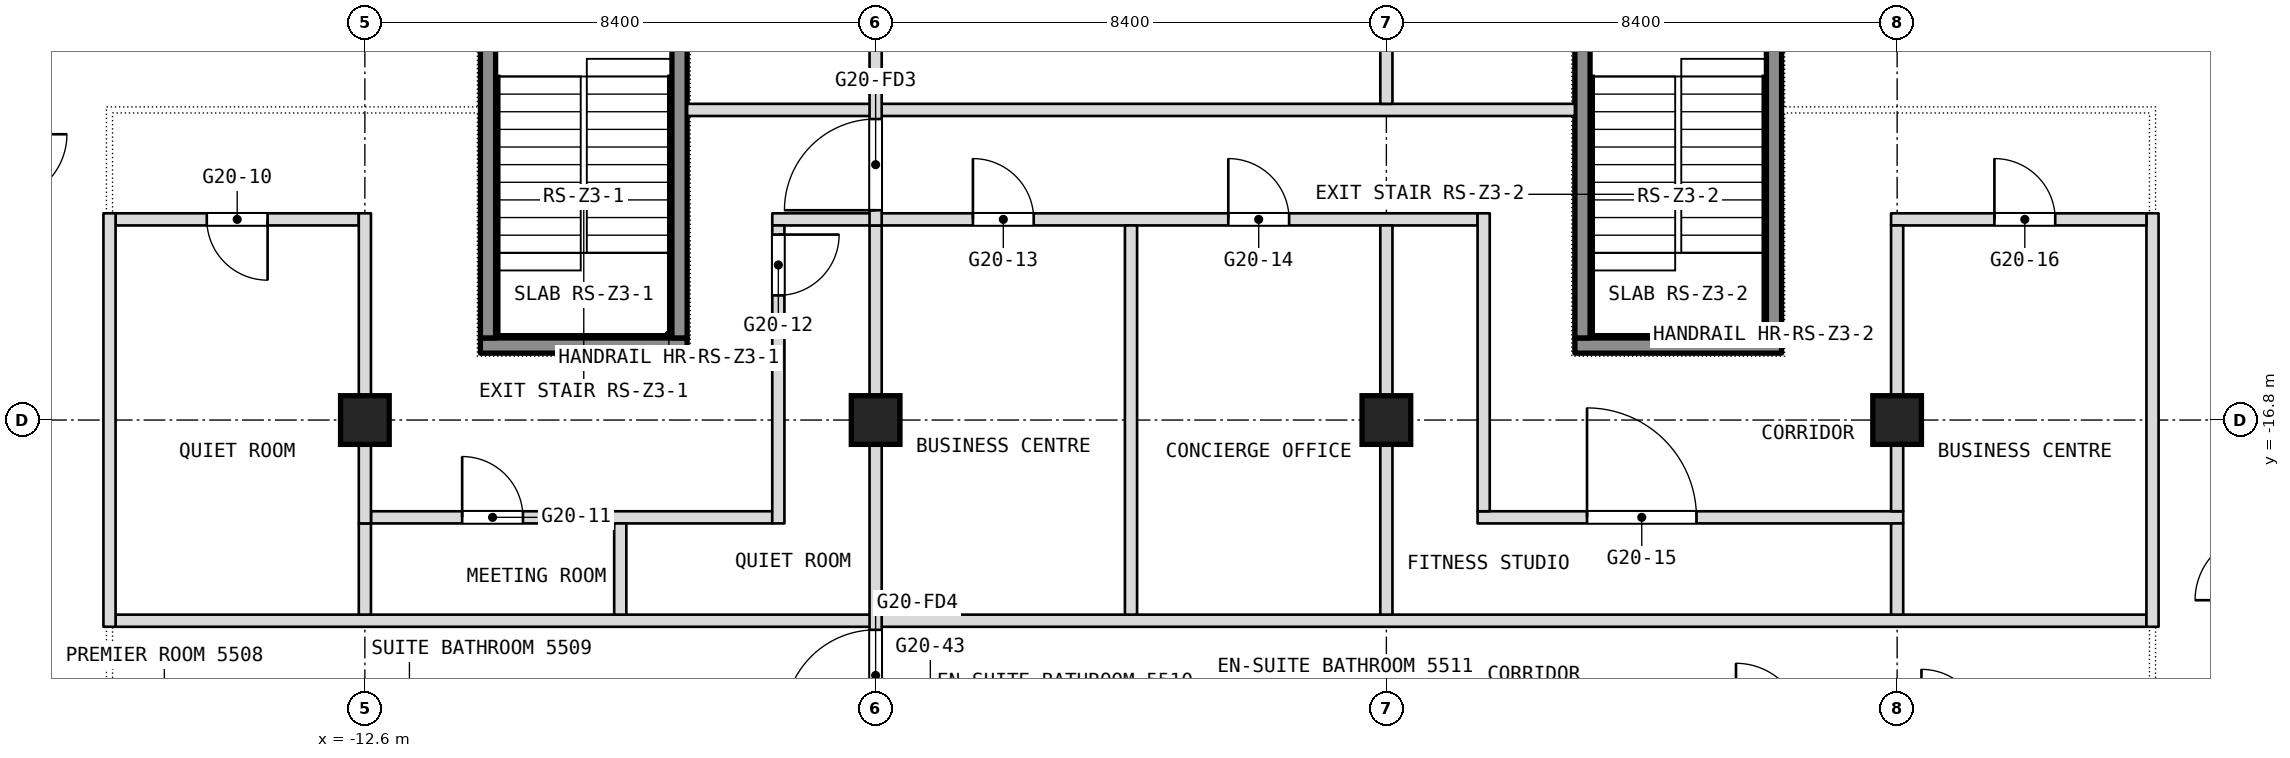
"""IFC4 building model, lengths in metres.
Left out: names, types, materials, properties, quantities, classifications, styles, units other than length and angle.
Written with IfcOpenShell. Run it as: python <this file> out.ifc"""

import sys

from ifc_helpers import new_model, si_unit, direction, frame, frame_2d, origin, origin_2d, place, context, subcontext, project, spatial, rectangle, extrude, element, fill, save


model = new_model("IFC4")
c1 = context("Model", 3, precision=1e-05, world=origin(), true_north=direction((0.0, 1.0)))
c2 = subcontext(c1, "Body", "Model", "MODEL_VIEW")
j1 = project(units=[si_unit("LENGTHUNIT", "METRE"), si_unit("PLANEANGLEUNIT", "RADIAN")], contexts=[c1])
p1 = place(None, origin())
s1 = spatial("IfcSite", under=j1, at=p1, CompositionType="ELEMENT")
p2 = place(p1, origin())
s2 = spatial("IfcBuilding", under=s1, at=p2, CompositionType="ELEMENT")
p3 = place(p2, frame((0.0, 0.0, 234.5)))
s3 = spatial("IfcBuildingStorey", under=s2, at=p3, CompositionType="ELEMENT", Elevation=234.5)
for number, where, z_axis, x_axis in (
    (1, (-12.6, -16.8, 0.0), (0.0, 0.0, 1.0), (1.0, 0.0, 0.0)),
    (2, (-4.2, -16.8, 0.0), (0.0, 0.0, 1.0), (1.0, 0.0, 0.0)),
    (3, (4.2, -16.8, 0.0), (0.0, 0.0, 1.0), (1.0, 0.0, 0.0)),
    (4, (12.6, -16.8, 0.0), (0.0, 0.0, 1.0), (1.0, 0.0, 0.0)),
):
    element("IfcColumn", number, at=place(p3, frame(where, z_axis=z_axis, x_axis=x_axis)), inside=s3, PredefinedType="COLUMN", context=c2, shape_type="SweptSolid", body=[
        extrude(rectangle(XDim=0.8, YDim=0.8, at=origin_2d()), origin(), (0.0, 0.0, 1.0), 3.6),
    ])
p4 = place(p3, frame((-16.7, -20.1, 0.0), z_axis=(0.0, 0.0, 1.0), x_axis=(1.0, 0.0, 0.0)))
e5 = element("IfcWall", 5, at=p4, inside=s3, PredefinedType="PARTITIONING", context=c2, shape_type="SweptSolid", body=[
    extrude(rectangle(XDim=33.4, YDim=0.2, at=frame_2d((16.7, 0.0))), origin(), (0.0, 0.0, 1.0), 3.34),
])
p5 = place(p3, frame((-12.5, -18.4, 0.0), z_axis=(0.0, 0.0, 1.0), x_axis=(1.0, 0.0, 0.0)))
e6 = element("IfcWall", 6, at=p5, inside=s3, PredefinedType="PARTITIONING", context=c2, shape_type="SweptSolid", body=[
    extrude(rectangle(XDim=6.6, YDim=0.2, at=frame_2d((3.3, 0.0))), origin(), (0.0, 0.0, 1.0), 3.34),
])
p6 = place(p5, frame((1.5, 0.0, 0.0)))
e7 = element("IfcOpeningElement", 7, at=p6, cuts=e6, PredefinedType="OPENING", context=c2, shape_type="SweptSolid", body=[
    extrude(rectangle(XDim=1.0, YDim=2.1, at=frame_2d((0.5, 1.05))), frame((0.0, 0.1, 0.0), z_axis=(0.0, -1.0, 0.0), x_axis=(1.0, 0.0, 0.0)), (0.0, 0.0, 1.0), 0.2),
])
p7 = place(p3, frame((5.7, -18.4, 0.0), z_axis=(0.0, 0.0, 1.0), x_axis=(1.0, 0.0, 0.0)))
e8 = element("IfcWall", 8, at=p7, inside=s3, PredefinedType="PARTITIONING", context=c2, shape_type="SweptSolid", body=[
    extrude(rectangle(XDim=7.0, YDim=0.2, at=frame_2d((3.5, 0.0))), origin(), (0.0, 0.0, 1.0), 3.34),
])
p8 = place(p7, frame((1.8, 0.0, 0.0)))
e9 = element("IfcOpeningElement", 9, at=p8, cuts=e8, PredefinedType="OPENING", context=c2, shape_type="SweptSolid", body=[
    extrude(rectangle(XDim=1.8, YDim=2.1, at=frame_2d((0.9, 1.05))), frame((0.0, 0.1, 0.0), z_axis=(0.0, -1.0, 0.0), x_axis=(1.0, 0.0, 0.0)), (0.0, 0.0, 1.0), 0.2),
])
p9 = place(p3, frame((16.8, -20.2, 0.0), z_axis=(0.0, 0.0, 1.0), x_axis=(0.0, 1.0, 0.0)))
e10 = element("IfcWall", 10, at=p9, inside=s3, PredefinedType="PARTITIONING", context=c2, shape_type="SweptSolid", body=[
    extrude(rectangle(XDim=6.8, YDim=0.2, at=frame_2d((3.4, 0.0))), origin(), (0.0, 0.0, 1.0), 3.34),
])
p10 = place(p3, frame((-16.7, -13.5, 0.0), z_axis=(0.0, 0.0, 1.0), x_axis=(1.0, 0.0, 0.0)))
e11 = element("IfcWall", 11, at=p10, inside=s3, PredefinedType="PARTITIONING", context=c2, shape_type="SweptSolid", body=[
    extrude(rectangle(XDim=4.0, YDim=0.2, at=frame_2d((2.0, 0.0))), origin(), (0.0, 0.0, 1.0), 3.34),
])
p11 = place(p10, frame((1.5, 0.0, 0.0)))
e12 = element("IfcOpeningElement", 12, at=p11, cuts=e11, PredefinedType="OPENING", context=c2, shape_type="SweptSolid", body=[
    extrude(rectangle(XDim=1.0, YDim=2.1, at=frame_2d((0.5, 1.05))), frame((0.0, 0.1, 0.0), z_axis=(0.0, -1.0, 0.0), x_axis=(1.0, 0.0, 0.0)), (0.0, 0.0, 1.0), 0.2),
])
p12 = place(p3, frame((-5.9, -13.5, 0.0), z_axis=(0.0, 0.0, 1.0), x_axis=(1.0, 0.0, 0.0)))
e13 = element("IfcWall", 13, at=p12, inside=s3, PredefinedType="PARTITIONING", context=c2, shape_type="SweptSolid", body=[
    extrude(rectangle(XDim=11.6, YDim=0.2, at=frame_2d((5.8, 0.0))), origin(), (0.0, 0.0, 1.0), 3.34),
])
p13 = place(p12, frame((3.3, 0.0, 0.0)))
e14 = element("IfcOpeningElement", 14, at=p13, cuts=e13, PredefinedType="OPENING", context=c2, shape_type="SweptSolid", body=[
    extrude(rectangle(XDim=1.0, YDim=2.1, at=frame_2d((0.5, 1.05))), frame((0.0, 0.1, 0.0), z_axis=(0.0, -1.0, 0.0), x_axis=(1.0, 0.0, 0.0)), (0.0, 0.0, 1.0), 0.2),
])
p14 = place(p12, frame((7.5, 0.0, 0.0)))
e15 = element("IfcOpeningElement", 15, at=p14, cuts=e13, PredefinedType="OPENING", context=c2, shape_type="SweptSolid", body=[
    extrude(rectangle(XDim=1.0, YDim=2.1, at=frame_2d((0.5, 1.05))), frame((0.0, 0.1, 0.0), z_axis=(0.0, -1.0, 0.0), x_axis=(1.0, 0.0, 0.0)), (0.0, 0.0, 1.0), 0.2),
])
p15 = place(p3, frame((12.5, -13.5, 0.0), z_axis=(0.0, 0.0, 1.0), x_axis=(1.0, 0.0, 0.0)))
e16 = element("IfcWall", 16, at=p15, inside=s3, PredefinedType="PARTITIONING", context=c2, shape_type="SweptSolid", body=[
    extrude(rectangle(XDim=4.2, YDim=0.2, at=frame_2d((2.1, 0.0))), origin(), (0.0, 0.0, 1.0), 3.34),
])
p16 = place(p15, frame((1.7, 0.0, 0.0)))
e17 = element("IfcOpeningElement", 17, at=p16, cuts=e16, PredefinedType="OPENING", context=c2, shape_type="SweptSolid", body=[
    extrude(rectangle(XDim=1.0, YDim=2.1, at=frame_2d((0.5, 1.05))), frame((0.0, 0.1, 0.0), z_axis=(0.0, -1.0, 0.0), x_axis=(1.0, 0.0, 0.0)), (0.0, 0.0, 1.0), 0.2),
])
p17 = place(p3, frame((12.6, -20.0, 0.0), z_axis=(0.0, 0.0, 1.0), x_axis=(0.0, 1.0, 0.0)))
e18 = element("IfcWall", 18, at=p17, inside=s3, PredefinedType="PARTITIONING", context=c2, shape_type="SweptSolid", body=[
    extrude(rectangle(XDim=1.5, YDim=0.2, at=frame_2d((0.75, 0.0))), origin(), (0.0, 0.0, 1.0), 3.34),
])
p18 = place(p3, frame((12.6, -18.3, 0.0), z_axis=(0.0, 0.0, 1.0), x_axis=(0.0, 1.0, 0.0)))
e19 = element("IfcWall", 19, at=p18, inside=s3, PredefinedType="PARTITIONING", context=c2, shape_type="SweptSolid", body=[
    extrude(rectangle(XDim=4.7, YDim=0.2, at=frame_2d((2.35, 0.0))), origin(), (0.0, 0.0, 1.0), 3.34),
])
p19 = place(p3, frame((-7.3, -11.7, 0.0), z_axis=(0.0, 0.0, 1.0), x_axis=(1.0, 0.0, 0.0)))
e20 = element("IfcWall", 20, at=p19, inside=s3, PredefinedType="PARTITIONING", context=c2, shape_type="SweptSolid", body=[
    extrude(rectangle(XDim=14.6, YDim=0.2, at=frame_2d((7.3, 0.0))), origin(), (0.0, 0.0, 1.0), 3.34),
])
p20 = place(p3, frame((5.8, -18.3, 0.0), z_axis=(0.0, 0.0, 1.0), x_axis=(0.0, 1.0, 0.0)))
e21 = element("IfcWall", 21, at=p20, inside=s3, PredefinedType="PARTITIONING", context=c2, shape_type="SweptSolid", body=[
    extrude(rectangle(XDim=4.9, YDim=0.2, at=frame_2d((2.45, 0.0))), origin(), (0.0, 0.0, 1.0), 3.34),
])
p21 = place(p3, frame((4.2, -20.0, 0.0), z_axis=(0.0, 0.0, 1.0), x_axis=(0.0, 1.0, 0.0)))
e22 = element("IfcWall", 22, at=p21, inside=s3, PredefinedType="PARTITIONING", context=c2, shape_type="SweptSolid", body=[
    extrude(rectangle(XDim=6.4, YDim=0.2, at=frame_2d((3.2, 0.0))), origin(), (0.0, 0.0, 1.0), 3.34),
])
p22 = place(p3, frame((4.2, -11.6, 0.0), z_axis=(0.0, 0.0, 1.0), x_axis=(0.0, 1.0, 0.0)))
e23 = element("IfcWall", 23, at=p22, inside=s3, PredefinedType="PARTITIONING", context=c2, shape_type="SweptSolid", body=[
    extrude(rectangle(XDim=9.7, YDim=0.2, at=frame_2d((4.85, 0.0))), origin(), (0.0, 0.0, 1.0), 3.34),
])
p23 = place(p3, frame((0.0, -20.0, 0.0), z_axis=(0.0, 0.0, 1.0), x_axis=(0.0, 1.0, 0.0)))
e24 = element("IfcWall", 24, at=p23, inside=s3, PredefinedType="PARTITIONING", context=c2, shape_type="SweptSolid", body=[
    extrude(rectangle(XDim=6.4, YDim=0.2, at=frame_2d((3.2, 0.0))), origin(), (0.0, 0.0, 1.0), 3.34),
])
p24 = place(p3, frame((-4.2, -22.0, 0.0), z_axis=(0.0, 0.0, 1.0), x_axis=(0.0, 1.0, 0.0)))
e25 = element("IfcWall", 25, at=p24, inside=s3, PredefinedType="PARTITIONING", context=c2, shape_type="SweptSolid", body=[
    extrude(rectangle(XDim=8.4, YDim=0.2, at=frame_2d((4.2, 0.0))), origin(), (0.0, 0.0, 1.0), 3.34),
])
p25 = place(p24, frame((0.25, 0.0, 0.0)))
e26 = element("IfcOpeningElement", 26, at=p25, cuts=e25, PredefinedType="OPENING", context=c2, shape_type="SweptSolid", body=[
    extrude(rectangle(XDim=1.5, YDim=2.1, at=frame_2d((0.75, 1.05))), frame((0.0, 0.1, 0.0), z_axis=(0.0, -1.0, 0.0), x_axis=(1.0, 0.0, 0.0)), (0.0, 0.0, 1.0), 0.2),
])
p26 = place(p3, frame((-4.2, -13.6, 0.0), z_axis=(0.0, 0.0, 1.0), x_axis=(0.0, 1.0, 0.0)))
e27 = element("IfcWall", 27, at=p26, inside=s3, PredefinedType="PARTITIONING", context=c2, shape_type="SweptSolid", body=[
    extrude(rectangle(XDim=13.6, YDim=0.2, at=frame_2d((6.8, 0.0))), origin(), (0.0, 0.0, 1.0), 3.34),
])
p27 = place(p26, frame((11.95, 0.0, 0.0)))
e28 = element("IfcOpeningElement", 28, at=p27, cuts=e27, PredefinedType="OPENING", context=c2, shape_type="SweptSolid", body=[
    extrude(rectangle(XDim=1.5, YDim=2.1, at=frame_2d((0.75, 1.05))), frame((0.0, 0.1, 0.0), z_axis=(0.0, -1.0, 0.0), x_axis=(1.0, 0.0, 0.0)), (0.0, 0.0, 1.0), 0.2),
])
p28 = place(p26, frame((0.25, 0.0, 0.0)))
e29 = element("IfcOpeningElement", 29, at=p28, cuts=e27, PredefinedType="OPENING", context=c2, shape_type="SweptSolid", body=[
    extrude(rectangle(XDim=1.5, YDim=2.1, at=frame_2d((0.75, 1.05))), frame((0.0, 0.1, 0.0), z_axis=(0.0, -1.0, 0.0), x_axis=(1.0, 0.0, 0.0)), (0.0, 0.0, 1.0), 0.2),
])
p29 = place(p3, frame((-5.8, -18.5, 0.0), z_axis=(0.0, 0.0, 1.0), x_axis=(0.0, 1.0, 0.0)))
e30 = element("IfcWall", 30, at=p29, inside=s3, PredefinedType="PARTITIONING", context=c2, shape_type="SweptSolid", body=[
    extrude(rectangle(XDim=4.9, YDim=0.2, at=frame_2d((2.45, 0.0))), origin(), (0.0, 0.0, 1.0), 3.34),
])
p30 = place(p29, frame((3.75, 0.0, 0.0)))
e31 = element("IfcOpeningElement", 31, at=p30, cuts=e30, PredefinedType="OPENING", context=c2, shape_type="SweptSolid", body=[
    extrude(rectangle(XDim=1.0, YDim=2.1, at=frame_2d((0.5, 1.05))), frame((0.0, 0.1, 0.0), z_axis=(0.0, -1.0, 0.0), x_axis=(1.0, 0.0, 0.0)), (0.0, 0.0, 1.0), 0.2),
])
for number, where, z_axis, x_axis in (
    (32, (-8.4, -20.0, 0.0), (0.0, 0.0, 1.0), (0.0, 1.0, 0.0)),
    (33, (-12.6, -20.0, 0.0), (0.0, 0.0, 1.0), (0.0, 1.0, 0.0)),
):
    element("IfcWall", number, at=place(p3, frame(where, z_axis=z_axis, x_axis=x_axis)), inside=s3, PredefinedType="PARTITIONING", context=c2, shape_type="SweptSolid", body=[
        extrude(rectangle(XDim=1.5, YDim=0.2, at=frame_2d((0.75, 0.0))), origin(), (0.0, 0.0, 1.0), 3.34),
    ])
p31 = place(p3, frame((-12.6, -18.5, 0.0), z_axis=(0.0, 0.0, 1.0), x_axis=(0.0, 1.0, 0.0)))
e34 = element("IfcWall", 34, at=p31, inside=s3, PredefinedType="PARTITIONING", context=c2, shape_type="SweptSolid", body=[
    extrude(rectangle(XDim=5.1, YDim=0.2, at=frame_2d((2.55, 0.0))), origin(), (0.0, 0.0, 1.0), 3.34),
])
p32 = place(p3, frame((-16.8, -20.2, 0.0), z_axis=(0.0, 0.0, 1.0), x_axis=(0.0, 1.0, 0.0)))
e35 = element("IfcWall", 35, at=p32, inside=s3, PredefinedType="PARTITIONING", context=c2, shape_type="SweptSolid", body=[
    extrude(rectangle(XDim=6.8, YDim=0.2, at=frame_2d((3.4, 0.0))), origin(), (0.0, 0.0, 1.0), 3.34),
])
p33 = place(p3, frame((-10.7, -15.575, 0.1), z_axis=(0.0, 0.0, 1.0), x_axis=(1.0, 0.0, 0.0)))
e36 = element("IfcWall", 36, at=p33, inside=s3, PredefinedType="SHEAR", context=c2, shape_type="SweptSolid", body=[
    extrude(rectangle(XDim=3.4, YDim=0.25, at=frame_2d((1.7, 0.0))), origin(), (0.0, 0.0, 1.0), 3.6),
])
for number, where, z_axis, x_axis in (
    (37, (-10.575, -15.45, 0.1), (0.0, 0.0, 1.0), (0.0, 1.0, 0.0)),
    (38, (-7.425, -15.45, 0.1), (0.0, 0.0, 1.0), (0.0, 1.0, 0.0)),
):
    element("IfcWall", number, at=place(p3, frame(where, z_axis=z_axis, x_axis=x_axis)), inside=s3, PredefinedType="SHEAR", context=c2, shape_type="SweptSolid", body=[
        extrude(rectangle(XDim=5.7, YDim=0.25, at=frame_2d((2.85, 0.0))), origin(), (0.0, 0.0, 1.0), 3.6),
    ])
p34 = place(p3, frame((7.3, -15.575, 0.1), z_axis=(0.0, 0.0, 1.0), x_axis=(1.0, 0.0, 0.0)))
e39 = element("IfcWall", 39, at=p34, inside=s3, PredefinedType="SHEAR", context=c2, shape_type="SweptSolid", body=[
    extrude(rectangle(XDim=3.4, YDim=0.25, at=frame_2d((1.7, 0.0))), origin(), (0.0, 0.0, 1.0), 3.6),
])
for number, where, z_axis, x_axis in (
    (40, (7.425, -15.45, 0.1), (0.0, 0.0, 1.0), (0.0, 1.0, 0.0)),
    (41, (10.575, -15.45, 0.1), (0.0, 0.0, 1.0), (0.0, 1.0, 0.0)),
):
    element("IfcWall", number, at=place(p3, frame(where, z_axis=z_axis, x_axis=x_axis)), inside=s3, PredefinedType="SHEAR", context=c2, shape_type="SweptSolid", body=[
        extrude(rectangle(XDim=5.7, YDim=0.25, at=frame_2d((2.85, 0.0))), origin(), (0.0, 0.0, 1.0), 3.6),
    ])
p35 = place(p6, origin())
e42 = element("IfcDoor", 42, at=p35, inside=s3, OperationType="SINGLE_SWING_RIGHT", PredefinedType="DOOR", context=c2, shape_type="SweptSolid", body=[
    extrude(rectangle(XDim=1.0, YDim=2.1, at=frame_2d((0.5, 1.05))), frame((0.0, 0.025, 0.0), z_axis=(0.0, -1.0, 0.0), x_axis=(1.0, 0.0, 0.0)), (0.0, 0.0, 1.0), 0.05),
])
fill(e7, e42)
p36 = place(p8, origin())
e43 = element("IfcDoor", 43, at=p36, inside=s3, OperationType="DOUBLE_DOOR_SINGLE_SWING", PredefinedType="DOOR", context=c2, shape_type="SweptSolid", body=[
    extrude(rectangle(XDim=1.8, YDim=2.1, at=frame_2d((0.9, 1.05))), frame((0.0, 0.025, 0.0), z_axis=(0.0, -1.0, 0.0), x_axis=(1.0, 0.0, 0.0)), (0.0, 0.0, 1.0), 0.05),
])
fill(e9, e43)
p37 = place(p11, origin())
e44 = element("IfcDoor", 44, at=p37, inside=s3, OperationType="SINGLE_SWING_RIGHT", PredefinedType="DOOR", context=c2, shape_type="SweptSolid", body=[
    extrude(rectangle(XDim=1.0, YDim=2.1, at=frame_2d((0.5, 1.05))), frame((0.0, 0.025, 0.0), z_axis=(0.0, -1.0, 0.0), x_axis=(1.0, 0.0, 0.0)), (0.0, 0.0, 1.0), 0.05),
])
fill(e12, e44)
p38 = place(p13, origin())
e45 = element("IfcDoor", 45, at=p38, inside=s3, OperationType="SINGLE_SWING_LEFT", PredefinedType="DOOR", context=c2, shape_type="SweptSolid", body=[
    extrude(rectangle(XDim=1.0, YDim=2.1, at=frame_2d((0.5, 1.05))), frame((0.0, 0.025, 0.0), z_axis=(0.0, -1.0, 0.0), x_axis=(1.0, 0.0, 0.0)), (0.0, 0.0, 1.0), 0.05),
])
fill(e14, e45)
p39 = place(p14, origin())
e46 = element("IfcDoor", 46, at=p39, inside=s3, OperationType="SINGLE_SWING_RIGHT", PredefinedType="DOOR", context=c2, shape_type="SweptSolid", body=[
    extrude(rectangle(XDim=1.0, YDim=2.1, at=frame_2d((0.5, 1.05))), frame((0.0, 0.025, 0.0), z_axis=(0.0, -1.0, 0.0), x_axis=(1.0, 0.0, 0.0)), (0.0, 0.0, 1.0), 0.05),
])
fill(e15, e46)
p40 = place(p16, origin())
e47 = element("IfcDoor", 47, at=p40, inside=s3, OperationType="SINGLE_SWING_RIGHT", PredefinedType="DOOR", context=c2, shape_type="SweptSolid", body=[
    extrude(rectangle(XDim=1.0, YDim=2.1, at=frame_2d((0.5, 1.05))), frame((0.0, 0.025, 0.0), z_axis=(0.0, -1.0, 0.0), x_axis=(1.0, 0.0, 0.0)), (0.0, 0.0, 1.0), 0.05),
])
fill(e17, e47)
p41 = place(p30, origin())
e48 = element("IfcDoor", 48, at=p41, inside=s3, OperationType="SINGLE_SWING_RIGHT", PredefinedType="DOOR", context=c2, shape_type="SweptSolid", body=[
    extrude(rectangle(XDim=1.0, YDim=2.1, at=frame_2d((0.5, 1.05))), frame((0.0, 0.025, 0.0), z_axis=(0.0, -1.0, 0.0), x_axis=(1.0, 0.0, 0.0)), (0.0, 0.0, 1.0), 0.05),
])
fill(e31, e48)
p42 = place(p28, origin())
e49 = element("IfcDoor", 49, at=p42, inside=s3, OperationType="DOUBLE_DOOR_DOUBLE_SWING", PredefinedType="DOOR", context=c2, shape_type="SweptSolid", body=[
    extrude(rectangle(XDim=1.5, YDim=2.1, at=frame_2d((0.75, 1.05))), frame((0.0, 0.025, 0.0), z_axis=(0.0, -1.0, 0.0), x_axis=(1.0, 0.0, 0.0)), (0.0, 0.0, 1.0), 0.05),
])
fill(e29, e49)
p43 = place(p25, origin())
e50 = element("IfcDoor", 50, at=p43, inside=s3, OperationType="DOUBLE_DOOR_DOUBLE_SWING", PredefinedType="DOOR", context=c2, shape_type="SweptSolid", body=[
    extrude(rectangle(XDim=1.5, YDim=2.1, at=frame_2d((0.75, 1.05))), frame((0.0, 0.025, 0.0), z_axis=(0.0, -1.0, 0.0), x_axis=(1.0, 0.0, 0.0)), (0.0, 0.0, 1.0), 0.05),
])
fill(e26, e50)
save(model, sys.argv[1])
